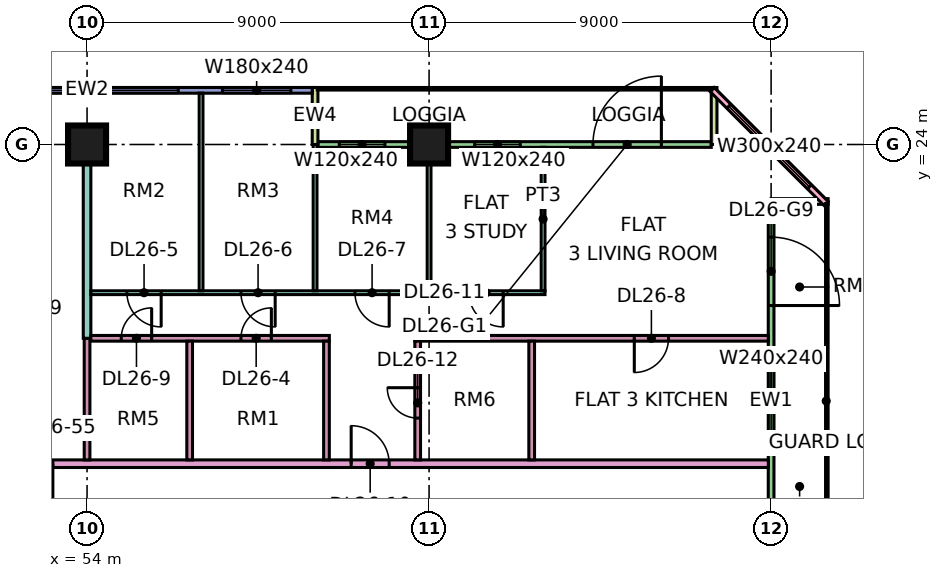
"""IFC4 building model, lengths in metres.
Left out: names, types, materials, properties, quantities, classifications, styles, units other than length and angle.
Written with IfcOpenShell. Run it as: python <this file> out.ifc"""

import sys

from ifc_helpers import new_model, si_unit, direction, frame, frame_2d, origin, origin_2d, place, context, subcontext, project, spatial, rectangle, extrude, element, fill, save


model = new_model("IFC4")
c1 = context("Model", 3, precision=1e-05, world=origin(), true_north=direction((0.0, 1.0)))
c2 = subcontext(c1, "Body", "Model", "MODEL_VIEW")
j1 = project(units=[si_unit("LENGTHUNIT", "METRE"), si_unit("PLANEANGLEUNIT", "RADIAN")], contexts=[c1])
p1 = place(None, origin())
s1 = spatial("IfcSite", under=j1, at=p1, CompositionType="ELEMENT")
p2 = place(p1, origin())
s2 = spatial("IfcBuilding", under=s1, at=p2, CompositionType="ELEMENT")
p3 = place(p2, frame((0.0, 0.0, 114.4)))
s3 = spatial("IfcBuildingStorey", under=s2, at=p3, CompositionType="ELEMENT", Elevation=114.4)
for number, where, z_axis, x_axis in (
    (1, (54.0, 24.0, 0.0), (0.0, 0.0, 1.0), (1.0, 0.0, 0.0)),
    (2, (63.0, 24.0, 0.0), (0.0, 0.0, 1.0), (1.0, 0.0, 0.0)),
):
    element("IfcColumn", number, at=place(p3, frame(where, z_axis=z_axis, x_axis=x_axis)), inside=s3, PredefinedType="COLUMN", context=c2, shape_type="SweptSolid", body=[
        extrude(rectangle(XDim=1.0, YDim=1.0, at=origin_2d()), origin(), (0.0, 0.0, 1.0), 3.75),
    ])
p4 = place(p3, frame((70.425, 24.0, 0.0), z_axis=(0.0, 0.0, 1.0), x_axis=(-1.0, 0.0, 0.0)))
e3 = element("IfcWall", 3, at=p4, inside=s3, PredefinedType="SOLIDWALL", context=c2, shape_type="SweptSolid", body=[
    extrude(rectangle(XDim=10.35, YDim=0.15, at=frame_2d((5.175, 0.0))), origin(), (0.0, 0.0, 1.0), 3.35),
])
p5 = place(p4, frame((1.312, 0.0, 0.0)))
e4 = element("IfcOpeningElement", 4, at=p5, cuts=e3, PredefinedType="OPENING", context=c2, shape_type="SweptSolid", body=[
    extrude(rectangle(XDim=1.8, YDim=2.4, at=frame_2d((0.9, 1.2))), frame((0.0, 0.085, 0.0), z_axis=(0.0, -1.0, 0.0), x_axis=(1.0, 0.0, 0.0)), (0.0, 0.0, 1.0), 0.17),
])
p6 = place(p4, frame((5.025, 0.0, 0.45)))
e5 = element("IfcOpeningElement", 5, at=p6, cuts=e3, PredefinedType="OPENING", context=c2, shape_type="SweptSolid", body=[
    extrude(rectangle(XDim=1.2, YDim=2.4, at=frame_2d((0.6, 1.2))), frame((0.0, 0.085, 0.0), z_axis=(0.0, -1.0, 0.0), x_axis=(1.0, 0.0, 0.0)), (0.0, 0.0, 1.0), 0.17),
])
p7 = place(p4, frame((8.587, 0.0, 0.45)))
e6 = element("IfcOpeningElement", 6, at=p7, cuts=e3, PredefinedType="OPENING", context=c2, shape_type="SweptSolid", body=[
    extrude(rectangle(XDim=1.2, YDim=2.4, at=frame_2d((0.6, 1.2))), frame((0.0, 0.085, 0.0), z_axis=(0.0, -1.0, 0.0), x_axis=(1.0, 0.0, 0.0)), (0.0, 0.0, 1.0), 0.17),
])
for number, where, z_axis, x_axis in (
    (7, (70.5, 25.5, 0.0), (0.0, 0.0, 1.0), (0.0, -1.0, 0.0)),
    (8, (60.0, 25.5, 0.0), (0.0, 0.0, 1.0), (0.0, -1.0, 0.0)),
):
    element("IfcWall", number, at=place(p3, frame(where, z_axis=z_axis, x_axis=x_axis)), inside=s3, PredefinedType="SOLIDWALL", context=c2, shape_type="SweptSolid", body=[
        extrude(rectangle(XDim=1.5, YDim=0.15, at=frame_2d((0.75, 0.0))), origin(), (0.0, 0.0, 1.0), 3.35),
    ])
p8 = place(p3, frame((59.925, 25.425, 0.0), z_axis=(0.0, 0.0, 1.0), x_axis=(-1.0, 0.0, 0.0)))
e9 = element("IfcWall", 9, at=p8, inside=s3, PredefinedType="SOLIDWALL", context=c2, shape_type="SweptSolid", body=[
    extrude(rectangle(XDim=11.85, YDim=0.15, at=frame_2d((5.925, 0.0))), origin(), (0.0, 0.0, 1.0), 3.35),
])
p9 = place(p8, frame((0.562, 0.0, 0.45)))
e10 = element("IfcOpeningElement", 10, at=p9, cuts=e9, PredefinedType="OPENING", context=c2, shape_type="SweptSolid", body=[
    extrude(rectangle(XDim=1.8, YDim=2.4, at=frame_2d((0.9, 1.2))), frame((0.0, 0.085, 0.0), z_axis=(0.0, -1.0, 0.0), x_axis=(1.0, 0.0, 0.0)), (0.0, 0.0, 1.0), 0.17),
])
p10 = place(p8, frame((3.525, 0.0, 0.45)))
e11 = element("IfcOpeningElement", 11, at=p10, cuts=e9, PredefinedType="OPENING", context=c2, shape_type="SweptSolid", body=[
    extrude(rectangle(XDim=1.8, YDim=2.4, at=frame_2d((0.9, 1.2))), frame((0.0, 0.085, 0.0), z_axis=(0.0, -1.0, 0.0), x_axis=(1.0, 0.0, 0.0)), (0.0, 0.0, 1.0), 0.17),
])
p11 = place(p8, frame((6.488, 0.0, 0.45)))
e12 = element("IfcOpeningElement", 12, at=p11, cuts=e9, PredefinedType="OPENING", context=c2, shape_type="SweptSolid", body=[
    extrude(rectangle(XDim=4.8, YDim=2.4, at=frame_2d((2.4, 1.2))), frame((0.0, 0.085, 0.0), z_axis=(0.0, -1.0, 0.0), x_axis=(1.0, 0.0, 0.0)), (0.0, 0.0, 1.0), 0.17),
])
p12 = place(p3, frame((72.0, 12.075, 0.0), z_axis=(0.0, 0.0, 1.0), x_axis=(0.0, 1.0, 0.0)))
e13 = element("IfcWall", 13, at=p12, inside=s3, PredefinedType="SOLIDWALL", context=c2, shape_type="SweptSolid", body=[
    extrude(rectangle(XDim=10.35, YDim=0.15, at=frame_2d((5.175, 0.0))), origin(), (0.0, 0.0, 1.0), 3.35),
])
p13 = place(p12, frame((3.975, 0.0, 0.45)))
e14 = element("IfcOpeningElement", 14, at=p13, cuts=e13, PredefinedType="OPENING", context=c2, shape_type="SweptSolid", body=[
    extrude(rectangle(XDim=2.4, YDim=2.4, at=frame_2d((1.2, 1.2))), frame((0.0, 0.085, 0.0), z_axis=(0.0, -1.0, 0.0), x_axis=(1.0, 0.0, 0.0)), (0.0, 0.0, 1.0), 0.17),
])
p14 = place(p12, frame((7.688, 0.0, 0.0)))
e15 = element("IfcOpeningElement", 15, at=p14, cuts=e13, PredefinedType="OPENING", context=c2, shape_type="SweptSolid", body=[
    extrude(rectangle(XDim=1.8, YDim=2.4, at=frame_2d((0.9, 1.2))), frame((0.0, 0.085, 0.0), z_axis=(0.0, -1.0, 0.0), x_axis=(1.0, 0.0, 0.0)), (0.0, 0.0, 1.0), 0.17),
])
p15 = place(p3, frame((73.5, 22.5, 0.0), z_axis=(0.0, 0.0, 1.0), x_axis=(-1.0, 0.0, 0.0)))
e16 = element("IfcWall", 16, at=p15, inside=s3, PredefinedType="SOLIDWALL", context=c2, shape_type="SweptSolid", body=[
    extrude(rectangle(XDim=1.5, YDim=0.15, at=frame_2d((0.75, 0.0))), origin(), (0.0, 0.0, 1.0), 3.35),
])
p16 = place(p3, frame((73.447, 22.447, 0.0), z_axis=(0.0, 0.0, 1.0), x_axis=(-0.707106781187, 0.707106781187, 0.0)))
e17 = element("IfcWall", 17, at=p16, inside=s3, PredefinedType="SOLIDWALL", context=c2, shape_type="SweptSolid", body=[
    extrude(rectangle(XDim=4.243, YDim=0.15, at=frame_2d((2.121, 0.0))), origin(), (0.0, 0.0, 1.0), 3.35),
])
p17 = place(p16, frame((0.621, 0.0, 0.45)))
e18 = element("IfcOpeningElement", 18, at=p17, cuts=e17, PredefinedType="OPENING", context=c2, shape_type="SweptSolid", body=[
    extrude(rectangle(XDim=3.0, YDim=2.4, at=frame_2d((1.5, 1.2))), frame((0.0, 0.085, 0.0), z_axis=(0.0, -1.0, 0.0), x_axis=(1.0, 0.0, 0.0)), (0.0, 0.0, 1.0), 0.17),
])
p18 = place(p3, frame((51.225, 15.6, 0.0), z_axis=(0.0, 0.0, 1.0), x_axis=(1.0, 0.0, 0.0)))
e19 = element("IfcWall", 19, at=p18, inside=s3, PredefinedType="PARTITIONING", context=c2, shape_type="SweptSolid", body=[
    extrude(rectangle(XDim=20.701, YDim=0.2, at=frame_2d((10.351, 0.0))), origin(), (0.0, 0.0, 1.0), 3.35),
])
p19 = place(p18, frame((9.725, 0.0, 0.0)))
e20 = element("IfcOpeningElement", 20, at=p19, cuts=e19, PredefinedType="OPENING", context=c2, shape_type="SweptSolid", body=[
    extrude(rectangle(XDim=1.0, YDim=2.1, at=frame_2d((0.5, 1.05))), frame((0.0, 0.11, 0.0), z_axis=(0.0, -1.0, 0.0), x_axis=(1.0, 0.0, 0.0)), (0.0, 0.0, 1.0), 0.22),
])
p20 = place(p18, frame((0.875, 0.0, 0.0)))
e21 = element("IfcOpeningElement", 21, at=p20, cuts=e19, PredefinedType="OPENING", context=c2, shape_type="SweptSolid", body=[
    extrude(rectangle(XDim=1.0, YDim=2.1, at=frame_2d((0.5, 1.05))), frame((0.0, 0.11, 0.0), z_axis=(0.0, -1.0, 0.0), x_axis=(1.0, 0.0, 0.0)), (0.0, 0.0, 1.0), 0.22),
])
p21 = place(p3, frame((54.0, 15.7, 0.0), z_axis=(0.0, 0.0, 1.0), x_axis=(0.0, 1.0, 0.0)))
e22 = element("IfcWall", 22, at=p21, inside=s3, PredefinedType="PARTITIONING", context=c2, shape_type="SweptSolid", body=[
    extrude(rectangle(XDim=3.2, YDim=0.15, at=frame_2d((1.6, 0.0))), origin(), (0.0, 0.0, 1.0), 3.35),
])
p22 = place(p3, frame((54.0, 18.9, 0.0), z_axis=(0.0, 0.0, 1.0), x_axis=(0.0, 1.0, 0.0)))
e23 = element("IfcWall", 23, at=p22, inside=s3, PredefinedType="PARTITIONING", context=c2, shape_type="SweptSolid", body=[
    extrude(rectangle(XDim=5.1, YDim=0.2, at=frame_2d((2.55, 0.0))), origin(), (0.0, 0.0, 1.0), 3.35),
])
p23 = place(p3, frame((54.1, 18.9, 0.0), z_axis=(0.0, 0.0, 1.0), x_axis=(1.0, 0.0, 0.0)))
e24 = element("IfcWall", 24, at=p23, inside=s3, PredefinedType="PARTITIONING", context=c2, shape_type="SweptSolid", body=[
    extrude(rectangle(XDim=6.275, YDim=0.15, at=frame_2d((3.137, 0.0))), origin(), (0.0, 0.0, 1.0), 3.35),
])
p24 = place(p23, frame((3.95, 0.0, 0.0)))
e25 = element("IfcOpeningElement", 25, at=p24, cuts=e24, PredefinedType="OPENING", context=c2, shape_type="SweptSolid", body=[
    extrude(rectangle(XDim=0.8, YDim=2.1, at=frame_2d((0.4, 1.05))), frame((0.0, 0.085, 0.0), z_axis=(0.0, -1.0, 0.0), x_axis=(1.0, 0.0, 0.0)), (0.0, 0.0, 1.0), 0.17),
])
p25 = place(p23, frame((0.8, 0.0, 0.0)))
e26 = element("IfcOpeningElement", 26, at=p25, cuts=e24, PredefinedType="OPENING", context=c2, shape_type="SweptSolid", body=[
    extrude(rectangle(XDim=0.8, YDim=2.1, at=frame_2d((0.4, 1.05))), frame((0.0, 0.085, 0.0), z_axis=(0.0, -1.0, 0.0), x_axis=(1.0, 0.0, 0.0)), (0.0, 0.0, 1.0), 0.17),
])
p26 = place(p3, frame((54.1, 20.1, 0.0), z_axis=(0.0, 0.0, 1.0), x_axis=(1.0, 0.0, 0.0)))
e27 = element("IfcWall", 27, at=p26, inside=s3, PredefinedType="PARTITIONING", context=c2, shape_type="SweptSolid", body=[
    extrude(rectangle(XDim=11.95, YDim=0.1, at=frame_2d((5.975, 0.0))), origin(), (0.0, 0.0, 1.0), 3.35),
])
p27 = place(p26, frame((0.95, 0.0, 0.0)))
e28 = element("IfcOpeningElement", 28, at=p27, cuts=e27, PredefinedType="OPENING", context=c2, shape_type="SweptSolid", body=[
    extrude(rectangle(XDim=0.9, YDim=2.1, at=frame_2d((0.45, 1.05))), frame((0.0, 0.06, 0.0), z_axis=(0.0, -1.0, 0.0), x_axis=(1.0, 0.0, 0.0)), (0.0, 0.0, 1.0), 0.12),
])
p28 = place(p26, frame((3.95, 0.0, 0.0)))
e29 = element("IfcOpeningElement", 29, at=p28, cuts=e27, PredefinedType="OPENING", context=c2, shape_type="SweptSolid", body=[
    extrude(rectangle(XDim=0.9, YDim=2.1, at=frame_2d((0.45, 1.05))), frame((0.0, 0.06, 0.0), z_axis=(0.0, -1.0, 0.0), x_axis=(1.0, 0.0, 0.0)), (0.0, 0.0, 1.0), 0.12),
])
p29 = place(p26, frame((6.95, 0.0, 0.0)))
e30 = element("IfcOpeningElement", 30, at=p29, cuts=e27, PredefinedType="OPENING", context=c2, shape_type="SweptSolid", body=[
    extrude(rectangle(XDim=0.9, YDim=2.1, at=frame_2d((0.45, 1.05))), frame((0.0, 0.06, 0.0), z_axis=(0.0, -1.0, 0.0), x_axis=(1.0, 0.0, 0.0)), (0.0, 0.0, 1.0), 0.12),
])
p30 = place(p26, frame((9.95, 0.0, 0.0)))
e31 = element("IfcOpeningElement", 31, at=p30, cuts=e27, PredefinedType="OPENING", context=c2, shape_type="SweptSolid", body=[
    extrude(rectangle(XDim=0.9, YDim=2.1, at=frame_2d((0.45, 1.05))), frame((0.0, 0.06, 0.0), z_axis=(0.0, -1.0, 0.0), x_axis=(1.0, 0.0, 0.0)), (0.0, 0.0, 1.0), 0.12),
])
p31 = place(p3, frame((56.7, 15.7, 0.0), z_axis=(0.0, 0.0, 1.0), x_axis=(0.0, 1.0, 0.0)))
e32 = element("IfcWall", 32, at=p31, inside=s3, PredefinedType="PARTITIONING", context=c2, shape_type="SweptSolid", body=[
    extrude(rectangle(XDim=3.125, YDim=0.15, at=frame_2d((1.562, 0.0))), origin(), (0.0, 0.0, 1.0), 3.35),
])
p32 = place(p3, frame((57.0, 20.15, 0.0), z_axis=(0.0, 0.0, 1.0), x_axis=(0.0, 1.0, 0.0)))
e33 = element("IfcWall", 33, at=p32, inside=s3, PredefinedType="PARTITIONING", context=c2, shape_type="SweptSolid", body=[
    extrude(rectangle(XDim=5.201, YDim=0.1, at=frame_2d((2.601, 0.0))), origin(), (0.0, 0.0, 1.0), 3.35),
])
p33 = place(p3, frame((60.0, 20.15, 0.0), z_axis=(0.0, 0.0, 1.0), x_axis=(0.0, 1.0, 0.0)))
e34 = element("IfcWall", 34, at=p33, inside=s3, PredefinedType="PARTITIONING", context=c2, shape_type="SweptSolid", body=[
    extrude(rectangle(XDim=3.85, YDim=0.1, at=frame_2d((1.925, 0.0))), origin(), (0.0, 0.0, 1.0), 3.35),
])
p34 = place(p3, frame((60.3, 15.7, 0.0), z_axis=(0.0, 0.0, 1.0), x_axis=(0.0, 1.0, 0.0)))
e35 = element("IfcWall", 35, at=p34, inside=s3, PredefinedType="PARTITIONING", context=c2, shape_type="SweptSolid", body=[
    extrude(rectangle(XDim=3.125, YDim=0.15, at=frame_2d((1.562, 0.0))), origin(), (0.0, 0.0, 1.0), 3.35),
])
p35 = place(p3, frame((62.625, 18.9, 0.0), z_axis=(0.0, 0.0, 1.0), x_axis=(1.0, 0.0, 0.0)))
e36 = element("IfcWall", 36, at=p35, inside=s3, PredefinedType="PARTITIONING", context=c2, shape_type="SweptSolid", body=[
    extrude(rectangle(XDim=9.301, YDim=0.15, at=frame_2d((4.65, 0.0))), origin(), (0.0, 0.0, 1.0), 3.35),
])
p36 = place(p35, frame((5.775, 0.0, 0.0)))
e37 = element("IfcOpeningElement", 37, at=p36, cuts=e36, PredefinedType="OPENING", context=c2, shape_type="SweptSolid", body=[
    extrude(rectangle(XDim=0.9, YDim=2.1, at=frame_2d((0.45, 1.05))), frame((0.0, 0.085, 0.0), z_axis=(0.0, -1.0, 0.0), x_axis=(1.0, 0.0, 0.0)), (0.0, 0.0, 1.0), 0.17),
])
p37 = place(p3, frame((62.7, 15.7, 0.0), z_axis=(0.0, 0.0, 1.0), x_axis=(0.0, 1.0, 0.0)))
e38 = element("IfcWall", 38, at=p37, inside=s3, PredefinedType="PARTITIONING", context=c2, shape_type="SweptSolid", body=[
    extrude(rectangle(XDim=3.125, YDim=0.15, at=frame_2d((1.562, 0.0))), origin(), (0.0, 0.0, 1.0), 3.35),
])
p38 = place(p37, frame((1.1, 0.0, 0.0)))
e39 = element("IfcOpeningElement", 39, at=p38, cuts=e38, PredefinedType="OPENING", context=c2, shape_type="SweptSolid", body=[
    extrude(rectangle(XDim=0.8, YDim=2.1, at=frame_2d((0.4, 1.05))), frame((0.0, 0.085, 0.0), z_axis=(0.0, -1.0, 0.0), x_axis=(1.0, 0.0, 0.0)), (0.0, 0.0, 1.0), 0.17),
])
p39 = place(p3, frame((63.0, 20.15, 0.0), z_axis=(0.0, 0.0, 1.0), x_axis=(0.0, 1.0, 0.0)))
e40 = element("IfcWall", 40, at=p39, inside=s3, PredefinedType="PARTITIONING", context=c2, shape_type="SweptSolid", body=[
    extrude(rectangle(XDim=3.776, YDim=0.1, at=frame_2d((1.888, 0.0))), origin(), (0.0, 0.0, 1.0), 3.35),
])
p40 = place(p3, frame((65.7, 15.7, 0.0), z_axis=(0.0, 0.0, 1.0), x_axis=(0.0, 1.0, 0.0)))
e41 = element("IfcWall", 41, at=p40, inside=s3, PredefinedType="PARTITIONING", context=c2, shape_type="SweptSolid", body=[
    extrude(rectangle(XDim=3.125, YDim=0.15, at=frame_2d((1.562, 0.0))), origin(), (0.0, 0.0, 1.0), 3.35),
])
p41 = place(p3, frame((66.0, 20.15, 0.0), z_axis=(0.0, 0.0, 1.0), x_axis=(0.0, 1.0, 0.0)))
e42 = element("IfcWall", 42, at=p41, inside=s3, PredefinedType="PARTITIONING", context=c2, shape_type="SweptSolid", body=[
    extrude(rectangle(XDim=3.776, YDim=0.1, at=frame_2d((1.888, 0.0))), origin(), (0.0, 0.0, 1.0), 3.35),
])
p42 = place(p5, frame((1.8, 0.0, 0.0), z_axis=(0.0, 0.0, 1.0), x_axis=(-1.0, 0.0, 0.0)))
e43 = element("IfcDoor", 43, at=p42, inside=s3, OperationType="DOUBLE_DOOR_SINGLE_SWING", PredefinedType="DOOR", context=c2, shape_type="SweptSolid", body=[
    extrude(rectangle(XDim=1.8, YDim=2.4, at=frame_2d((0.9, 1.2))), frame((0.0, 0.025, 0.0), z_axis=(0.0, -1.0, 0.0), x_axis=(1.0, 0.0, 0.0)), (0.0, 0.0, 1.0), 0.05),
])
fill(e4, e43)
p43 = place(p6, origin())
e44 = element("IfcWindow", 44, at=p43, inside=s3, PartitioningType="SINGLE_PANEL", PredefinedType="WINDOW", context=c2, shape_type="SweptSolid", body=[
    extrude(rectangle(XDim=1.2, YDim=2.4, at=frame_2d((0.6, 1.2))), frame((0.0, 0.03, 0.0), z_axis=(0.0, -1.0, 0.0), x_axis=(1.0, 0.0, 0.0)), (0.0, 0.0, 1.0), 0.06),
])
fill(e5, e44)
p44 = place(p7, origin())
e45 = element("IfcWindow", 45, at=p44, inside=s3, PartitioningType="SINGLE_PANEL", PredefinedType="WINDOW", context=c2, shape_type="SweptSolid", body=[
    extrude(rectangle(XDim=1.2, YDim=2.4, at=frame_2d((0.6, 1.2))), frame((0.0, 0.03, 0.0), z_axis=(0.0, -1.0, 0.0), x_axis=(1.0, 0.0, 0.0)), (0.0, 0.0, 1.0), 0.06),
])
fill(e6, e45)
p45 = place(p9, origin())
e46 = element("IfcWindow", 46, at=p45, inside=s3, PartitioningType="SINGLE_PANEL", PredefinedType="WINDOW", context=c2, shape_type="SweptSolid", body=[
    extrude(rectangle(XDim=1.8, YDim=2.4, at=frame_2d((0.9, 1.2))), frame((0.0, 0.03, 0.0), z_axis=(0.0, -1.0, 0.0), x_axis=(1.0, 0.0, 0.0)), (0.0, 0.0, 1.0), 0.06),
])
fill(e10, e46)
p46 = place(p10, origin())
e47 = element("IfcWindow", 47, at=p46, inside=s3, PartitioningType="SINGLE_PANEL", PredefinedType="WINDOW", context=c2, shape_type="SweptSolid", body=[
    extrude(rectangle(XDim=1.8, YDim=2.4, at=frame_2d((0.9, 1.2))), frame((0.0, 0.03, 0.0), z_axis=(0.0, -1.0, 0.0), x_axis=(1.0, 0.0, 0.0)), (0.0, 0.0, 1.0), 0.06),
])
fill(e11, e47)
p47 = place(p11, origin())
e48 = element("IfcWindow", 48, at=p47, inside=s3, PartitioningType="SINGLE_PANEL", PredefinedType="WINDOW", context=c2, shape_type="SweptSolid", body=[
    extrude(rectangle(XDim=4.8, YDim=2.4, at=frame_2d((2.4, 1.2))), frame((0.0, 0.03, 0.0), z_axis=(0.0, -1.0, 0.0), x_axis=(1.0, 0.0, 0.0)), (0.0, 0.0, 1.0), 0.06),
])
fill(e12, e48)
p48 = place(p13, origin())
e49 = element("IfcWindow", 49, at=p48, inside=s3, PartitioningType="SINGLE_PANEL", PredefinedType="WINDOW", context=c2, shape_type="SweptSolid", body=[
    extrude(rectangle(XDim=2.4, YDim=2.4, at=frame_2d((1.2, 1.2))), frame((0.0, 0.03, 0.0), z_axis=(0.0, -1.0, 0.0), x_axis=(1.0, 0.0, 0.0)), (0.0, 0.0, 1.0), 0.06),
])
fill(e14, e49)
p49 = place(p14, frame((1.8, 0.0, 0.0), z_axis=(0.0, 0.0, 1.0), x_axis=(-1.0, 0.0, 0.0)))
e50 = element("IfcDoor", 50, at=p49, inside=s3, OperationType="DOUBLE_DOOR_SINGLE_SWING", PredefinedType="DOOR", context=c2, shape_type="SweptSolid", body=[
    extrude(rectangle(XDim=1.8, YDim=2.4, at=frame_2d((0.9, 1.2))), frame((0.0, 0.025, 0.0), z_axis=(0.0, -1.0, 0.0), x_axis=(1.0, 0.0, 0.0)), (0.0, 0.0, 1.0), 0.05),
])
fill(e15, e50)
p50 = place(p17, origin())
e51 = element("IfcWindow", 51, at=p50, inside=s3, PartitioningType="SINGLE_PANEL", PredefinedType="WINDOW", context=c2, shape_type="SweptSolid", body=[
    extrude(rectangle(XDim=3.0, YDim=2.4, at=frame_2d((1.5, 1.2))), frame((0.0, 0.03, 0.0), z_axis=(0.0, -1.0, 0.0), x_axis=(1.0, 0.0, 0.0)), (0.0, 0.0, 1.0), 0.06),
])
fill(e18, e51)
p51 = place(p24, frame((0.8, 0.0, 0.0), z_axis=(0.0, 0.0, 1.0), x_axis=(-1.0, 0.0, 0.0)))
e52 = element("IfcDoor", 52, at=p51, inside=s3, OperationType="SINGLE_SWING_RIGHT", PredefinedType="DOOR", context=c2, shape_type="SweptSolid", body=[
    extrude(rectangle(XDim=0.8, YDim=2.1, at=frame_2d((0.4, 1.05))), frame((0.0, 0.025, 0.0), z_axis=(0.0, -1.0, 0.0), x_axis=(1.0, 0.0, 0.0)), (0.0, 0.0, 1.0), 0.05),
])
fill(e25, e52)
p52 = place(p27, origin())
e53 = element("IfcDoor", 53, at=p52, inside=s3, OperationType="SINGLE_SWING_RIGHT", PredefinedType="DOOR", context=c2, shape_type="SweptSolid", body=[
    extrude(rectangle(XDim=0.9, YDim=2.1, at=frame_2d((0.45, 1.05))), frame((0.0, 0.025, 0.0), z_axis=(0.0, -1.0, 0.0), x_axis=(1.0, 0.0, 0.0)), (0.0, 0.0, 1.0), 0.05),
])
fill(e28, e53)
p53 = place(p28, origin())
e54 = element("IfcDoor", 54, at=p53, inside=s3, OperationType="SINGLE_SWING_RIGHT", PredefinedType="DOOR", context=c2, shape_type="SweptSolid", body=[
    extrude(rectangle(XDim=0.9, YDim=2.1, at=frame_2d((0.45, 1.05))), frame((0.0, 0.025, 0.0), z_axis=(0.0, -1.0, 0.0), x_axis=(1.0, 0.0, 0.0)), (0.0, 0.0, 1.0), 0.05),
])
fill(e29, e54)
p54 = place(p29, origin())
e55 = element("IfcDoor", 55, at=p54, inside=s3, OperationType="SINGLE_SWING_RIGHT", PredefinedType="DOOR", context=c2, shape_type="SweptSolid", body=[
    extrude(rectangle(XDim=0.9, YDim=2.1, at=frame_2d((0.45, 1.05))), frame((0.0, 0.025, 0.0), z_axis=(0.0, -1.0, 0.0), x_axis=(1.0, 0.0, 0.0)), (0.0, 0.0, 1.0), 0.05),
])
fill(e30, e55)
p55 = place(p36, frame((0.9, 0.0, 0.0), z_axis=(0.0, 0.0, 1.0), x_axis=(-1.0, 0.0, 0.0)))
e56 = element("IfcDoor", 56, at=p55, inside=s3, OperationType="SINGLE_SWING_LEFT", PredefinedType="DOOR", context=c2, shape_type="SweptSolid", body=[
    extrude(rectangle(XDim=0.9, YDim=2.1, at=frame_2d((0.45, 1.05))), frame((0.0, 0.025, 0.0), z_axis=(0.0, -1.0, 0.0), x_axis=(1.0, 0.0, 0.0)), (0.0, 0.0, 1.0), 0.05),
])
fill(e37, e56)
p56 = place(p25, frame((0.8, 0.0, 0.0), z_axis=(0.0, 0.0, 1.0), x_axis=(-1.0, 0.0, 0.0)))
e57 = element("IfcDoor", 57, at=p56, inside=s3, OperationType="SINGLE_SWING_RIGHT", PredefinedType="DOOR", context=c2, shape_type="SweptSolid", body=[
    extrude(rectangle(XDim=0.8, YDim=2.1, at=frame_2d((0.4, 1.05))), frame((0.0, 0.025, 0.0), z_axis=(0.0, -1.0, 0.0), x_axis=(1.0, 0.0, 0.0)), (0.0, 0.0, 1.0), 0.05),
])
fill(e26, e57)
p57 = place(p19, origin())
e58 = element("IfcDoor", 58, at=p57, inside=s3, OperationType="SINGLE_SWING_LEFT", PredefinedType="DOOR", context=c2, shape_type="SweptSolid", body=[
    extrude(rectangle(XDim=1.0, YDim=2.1, at=frame_2d((0.5, 1.05))), frame((0.0, 0.025, 0.0), z_axis=(0.0, -1.0, 0.0), x_axis=(1.0, 0.0, 0.0)), (0.0, 0.0, 1.0), 0.05),
])
fill(e20, e58)
p58 = place(p30, origin())
e59 = element("IfcDoor", 59, at=p58, inside=s3, OperationType="SINGLE_SWING_RIGHT", PredefinedType="DOOR", context=c2, shape_type="SweptSolid", body=[
    extrude(rectangle(XDim=0.9, YDim=2.1, at=frame_2d((0.45, 1.05))), frame((0.0, 0.025, 0.0), z_axis=(0.0, -1.0, 0.0), x_axis=(1.0, 0.0, 0.0)), (0.0, 0.0, 1.0), 0.05),
])
fill(e31, e59)
p59 = place(p38, frame((0.8, 0.0, 0.0), z_axis=(0.0, 0.0, 1.0), x_axis=(-1.0, 0.0, 0.0)))
e60 = element("IfcDoor", 60, at=p59, inside=s3, OperationType="SINGLE_SWING_RIGHT", PredefinedType="DOOR", context=c2, shape_type="SweptSolid", body=[
    extrude(rectangle(XDim=0.8, YDim=2.1, at=frame_2d((0.4, 1.05))), frame((0.0, 0.025, 0.0), z_axis=(0.0, -1.0, 0.0), x_axis=(1.0, 0.0, 0.0)), (0.0, 0.0, 1.0), 0.05),
])
fill(e39, e60)
p60 = place(p20, origin())
e61 = element("IfcDoor", 61, at=p60, inside=s3, OperationType="SINGLE_SWING_RIGHT", PredefinedType="DOOR", context=c2, shape_type="SweptSolid", body=[
    extrude(rectangle(XDim=1.0, YDim=2.1, at=frame_2d((0.5, 1.05))), frame((0.0, 0.025, 0.0), z_axis=(0.0, -1.0, 0.0), x_axis=(1.0, 0.0, 0.0)), (0.0, 0.0, 1.0), 0.05),
])
fill(e21, e61)
save(model, sys.argv[1])
